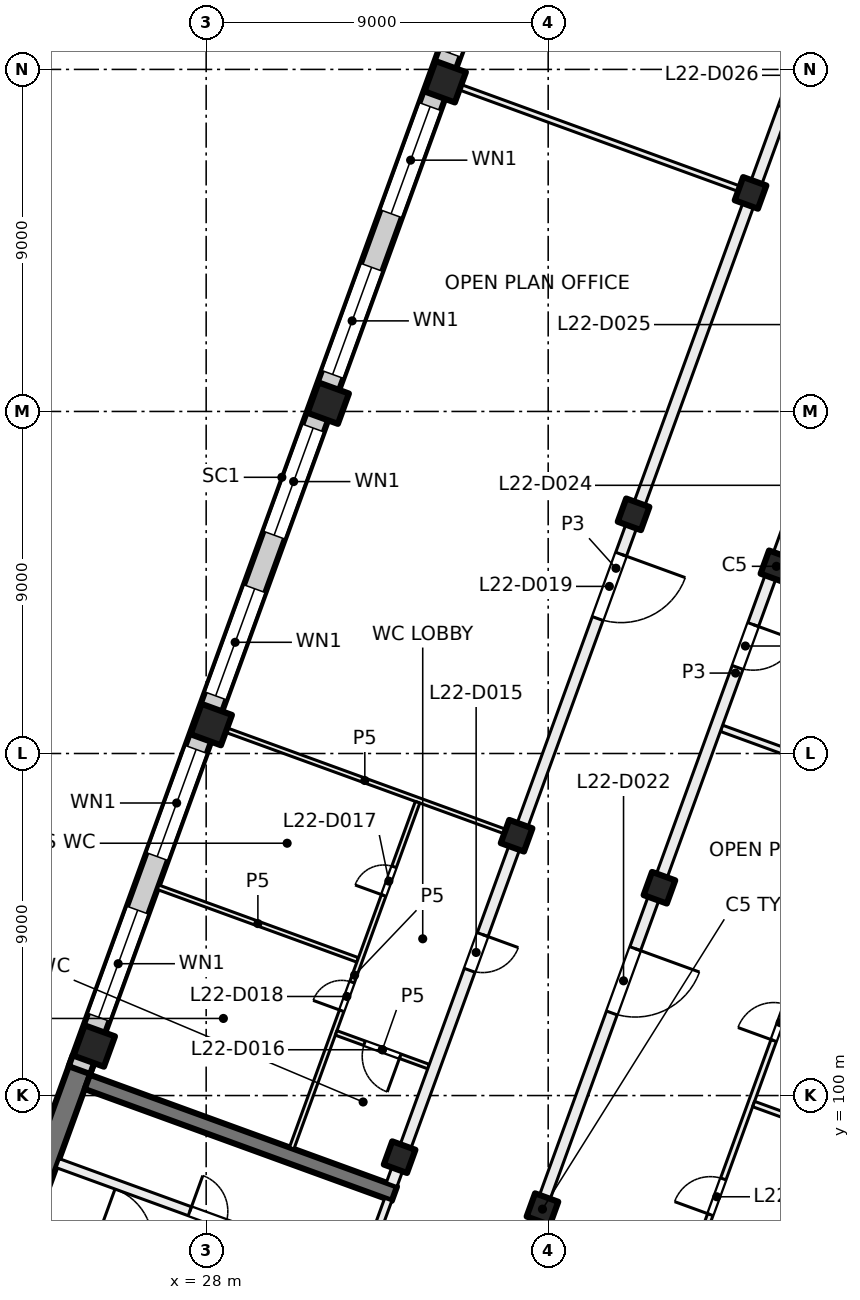
"""IFC4 building model, lengths in metres.
Left out: names, types, materials, properties, quantities, classifications, styles, units other than length and angle.
Written with IfcOpenShell. Run it as: python <this file> out.ifc"""

import sys

from ifc_helpers import new_model, si_unit, direction, frame, frame_2d, origin, origin_2d, place, context, subcontext, project, spatial, rectangle, extrude, element, fill, save


model = new_model("IFC4")
c1 = context("Model", 3, precision=1e-05, world=origin(), true_north=direction((0.0, 1.0)))
c2 = subcontext(c1, "Body", "Model", "MODEL_VIEW")
j1 = project(units=[si_unit("LENGTHUNIT", "METRE"), si_unit("PLANEANGLEUNIT", "RADIAN")], contexts=[c1])
p1 = place(None, origin())
s1 = spatial("IfcSite", under=j1, at=p1, CompositionType="ELEMENT")
p2 = place(p1, origin())
s2 = spatial("IfcBuilding", under=s1, at=p2, CompositionType="ELEMENT")
p3 = place(p2, frame((0.0, 0.0, 97.0)))
s3 = spatial("IfcBuildingStorey", under=s2, at=p3, CompositionType="ELEMENT", Elevation=97.0)
for number, where, z_axis, x_axis in (
    (1, (43.006, 113.925, 0.0), (0.0, 0.0, 1.0), (-0.342, -0.94, 0.0)),
    (2, (39.927, 105.468, 0.0), (0.0, 0.0, 1.0), (-0.342, -0.94, 0.0)),
    (3, (36.849, 97.011, 0.0), (0.0, 0.0, 1.0), (-0.342, -0.94, 0.0)),
    (4, (42.325, 123.751, 0.0), (0.0, 0.0, 1.0), (-0.342, -0.94, 0.0)),
    (5, (39.247, 115.293, 0.0), (0.0, 0.0, 1.0), (-0.342, -0.94, 0.0)),
    (6, (36.169, 106.836, 0.0), (0.0, 0.0, 1.0), (-0.342, -0.94, 0.0)),
    (7, (33.091, 98.379, 0.0), (0.0, 0.0, 1.0), (-0.342, -0.94, 0.0)),
):
    element("IfcColumn", number, at=place(p3, frame(where, z_axis=z_axis, x_axis=x_axis)), inside=s3, PredefinedType="COLUMN", context=c2, shape_type="SweptSolid", body=[
        extrude(rectangle(XDim=0.65, YDim=0.65, at=origin_2d()), origin(), (0.0, 0.0, 1.0), 4.0),
    ])
for number, where, z_axis, x_axis in (
    (8, (34.291, 126.675, 0.0), (0.0, 0.0, 1.0), (-0.342, -0.94, 0.0)),
    (9, (31.212, 118.218, 0.0), (0.0, 0.0, 1.0), (-0.342, -0.94, 0.0)),
    (10, (28.134, 109.76, 0.0), (0.0, 0.0, 1.0), (-0.342, -0.94, 0.0)),
    (11, (25.056, 101.303, 0.0), (0.0, 0.0, 1.0), (-0.342, -0.94, 0.0)),
):
    element("IfcColumn", number, at=place(p3, frame(where, z_axis=z_axis, x_axis=x_axis)), inside=s3, PredefinedType="COLUMN", context=c2, shape_type="SweptSolid", body=[
        extrude(rectangle(XDim=0.85, YDim=0.85, at=origin_2d()), origin(), (0.0, 0.0, 1.0), 4.0),
    ])
p4 = place(p3, frame((21.717, 92.568, 0.0), z_axis=(0.0, 0.0, 1.0), x_axis=(0.342017595281, 0.939693548195, 0.0)))
e12 = element("IfcWall", 12, at=p4, inside=s3, PredefinedType="SHEAR", context=c2, shape_type="SweptSolid", body=[
    extrude(rectangle(XDim=8.925, YDim=0.6, at=frame_2d((4.462, 0.0))), origin(), (0.0, 0.0, 1.0), 4.0),
])
p5 = place(p3, frame((32.953, 97.418, 0.0), z_axis=(0.0, 0.0, 1.0), x_axis=(-0.93969060187, 0.342025690201, 0.0)))
e13 = element("IfcWall", 13, at=p5, inside=s3, PredefinedType="SHEAR", context=c2, shape_type="SweptSolid", body=[
    extrude(rectangle(XDim=8.6, YDim=0.4, at=frame_2d((4.3, 0.0))), origin(), (0.0, 0.0, 1.0), 4.0),
])
p6 = place(p3, frame((24.666, 100.669, 0.0), z_axis=(0.0, 0.0, 1.0), x_axis=(0.34201964167, 0.939692803373, 0.0)))
e14 = element("IfcWall", 14, at=p6, inside=s3, PredefinedType="SOLIDWALL", context=c2, shape_type="SweptSolid", body=[
    extrude(rectangle(XDim=32.884, YDim=0.6, at=frame_2d((16.442, 0.0))), origin(), (0.0, 0.0, 1.0), 3.625),
])
p7 = place(p6, frame((1.48, 0.0, 0.9)))
e15 = element("IfcOpeningElement", 15, at=p7, cuts=e14, PredefinedType="OPENING", context=c2, shape_type="SweptSolid", body=[
    extrude(rectangle(XDim=3.0, YDim=2.4, at=frame_2d((1.5, 1.2))), frame((0.0, 0.31, 0.0), z_axis=(0.0, -1.0, 0.0), x_axis=(1.0, 0.0, 0.0)), (0.0, 0.0, 1.0), 0.62),
])
p8 = place(p6, frame((5.98, 0.0, 0.9)))
e16 = element("IfcOpeningElement", 16, at=p8, cuts=e14, PredefinedType="OPENING", context=c2, shape_type="SweptSolid", body=[
    extrude(rectangle(XDim=3.0, YDim=2.4, at=frame_2d((1.5, 1.2))), frame((0.0, 0.31, 0.0), z_axis=(0.0, -1.0, 0.0), x_axis=(1.0, 0.0, 0.0)), (0.0, 0.0, 1.0), 0.62),
])
p9 = place(p6, frame((10.48, 0.0, 0.9)))
e17 = element("IfcOpeningElement", 17, at=p9, cuts=e14, PredefinedType="OPENING", context=c2, shape_type="SweptSolid", body=[
    extrude(rectangle(XDim=3.0, YDim=2.4, at=frame_2d((1.5, 1.2))), frame((0.0, 0.31, 0.0), z_axis=(0.0, -1.0, 0.0), x_axis=(1.0, 0.0, 0.0)), (0.0, 0.0, 1.0), 0.62),
])
p10 = place(p6, frame((14.98, 0.0, 0.9)))
e18 = element("IfcOpeningElement", 18, at=p10, cuts=e14, PredefinedType="OPENING", context=c2, shape_type="SweptSolid", body=[
    extrude(rectangle(XDim=3.0, YDim=2.4, at=frame_2d((1.5, 1.2))), frame((0.0, 0.31, 0.0), z_axis=(0.0, -1.0, 0.0), x_axis=(1.0, 0.0, 0.0)), (0.0, 0.0, 1.0), 0.62),
])
p11 = place(p6, frame((19.48, 0.0, 0.9)))
e19 = element("IfcOpeningElement", 19, at=p11, cuts=e14, PredefinedType="OPENING", context=c2, shape_type="SweptSolid", body=[
    extrude(rectangle(XDim=3.0, YDim=2.4, at=frame_2d((1.5, 1.2))), frame((0.0, 0.31, 0.0), z_axis=(0.0, -1.0, 0.0), x_axis=(1.0, 0.0, 0.0)), (0.0, 0.0, 1.0), 0.62),
])
p12 = place(p6, frame((23.98, 0.0, 0.9)))
e20 = element("IfcOpeningElement", 20, at=p12, cuts=e14, PredefinedType="OPENING", context=c2, shape_type="SweptSolid", body=[
    extrude(rectangle(XDim=3.0, YDim=2.4, at=frame_2d((1.5, 1.2))), frame((0.0, 0.31, 0.0), z_axis=(0.0, -1.0, 0.0), x_axis=(1.0, 0.0, 0.0)), (0.0, 0.0, 1.0), 0.62),
])
p13 = place(p6, frame((28.48, 0.0, 0.9)))
e21 = element("IfcOpeningElement", 21, at=p13, cuts=e14, PredefinedType="OPENING", context=c2, shape_type="SweptSolid", body=[
    extrude(rectangle(XDim=3.0, YDim=2.4, at=frame_2d((1.5, 1.2))), frame((0.0, 0.31, 0.0), z_axis=(0.0, -1.0, 0.0), x_axis=(1.0, 0.0, 0.0)), (0.0, 0.0, 1.0), 0.62),
])
p14 = place(p3, frame((31.491, 93.693, 0.0), z_axis=(0.0, 0.0, 1.0), x_axis=(0.341995824804, 0.939701471648, 0.0)))
e22 = element("IfcWall", 22, at=p14, inside=s3, PredefinedType="PARTITIONING", context=c2, shape_type="SweptSolid", body=[
    extrude(rectangle(XDim=3.8, YDim=0.2, at=frame_2d((1.9, 0.0))), origin(), (0.0, 0.0, 1.0), 3.625),
])
p15 = place(p14, frame((0.3, 0.0, 0.0)))
e23 = element("IfcOpeningElement", 23, at=p15, cuts=e22, PredefinedType="OPENING", context=c2, shape_type="SweptSolid", body=[
    extrude(rectangle(XDim=1.2, YDim=2.1, at=frame_2d((0.6, 1.05))), frame((0.0, 0.11, 0.0), z_axis=(0.0, -1.0, 0.0), x_axis=(1.0, 0.0, 0.0)), (0.0, 0.0, 1.0), 0.22),
])
p16 = place(p3, frame((23.538, 96.694, 0.0), z_axis=(0.0, 0.0, 1.0), x_axis=(0.939691552312, -0.342023078919, 0.0)))
e24 = element("IfcWall", 24, at=p16, inside=s3, PredefinedType="PARTITIONING", context=c2, shape_type="SweptSolid", body=[
    extrude(rectangle(XDim=8.4, YDim=0.2, at=frame_2d((4.2, 0.0))), origin(), (0.0, 0.0, 1.0), 3.625),
])
p17 = place(p16, frame((1.65, 0.0, 0.0)))
e25 = element("IfcOpeningElement", 25, at=p17, cuts=e24, PredefinedType="OPENING", context=c2, shape_type="SweptSolid", body=[
    extrude(rectangle(XDim=1.5, YDim=2.1, at=frame_2d((0.75, 1.05))), frame((0.0, 0.11, 0.0), z_axis=(0.0, -1.0, 0.0), x_axis=(1.0, 0.0, 0.0)), (0.0, 0.0, 1.0), 0.22),
])
p18 = place(p3, frame((24.094, 98.221, 0.0), z_axis=(0.0, 0.0, 1.0), x_axis=(0.939691552312, -0.342023078919, 0.0)))
e26 = element("IfcWall", 26, at=p18, inside=s3, PredefinedType="PARTITIONING", context=c2, shape_type="SweptSolid", body=[
    extrude(rectangle(XDim=8.4, YDim=0.25, at=frame_2d((4.2, 0.0))), origin(), (0.0, 0.0, 1.0), 3.625),
])
p19 = place(p18, frame((3.7, 0.0, 0.0)))
e27 = element("IfcOpeningElement", 27, at=p19, cuts=e26, PredefinedType="OPENING", context=c2, shape_type="SweptSolid", body=[
    extrude(rectangle(XDim=1.0, YDim=2.1, at=frame_2d((0.5, 1.05))), frame((0.0, 0.135, 0.0), z_axis=(0.0, -1.0, 0.0), x_axis=(1.0, 0.0, 0.0)), (0.0, 0.0, 1.0), 0.27),
])
p20 = place(p3, frame((26.736, 105.48, 0.0), z_axis=(0.0, 0.0, 1.0), x_axis=(0.939690035435, -0.342027246436, 0.0)))
e28 = element("IfcWall", 28, at=p20, inside=s3, PredefinedType="PARTITIONING", context=c2, shape_type="SweptSolid", body=[
    extrude(rectangle(XDim=5.587, YDim=0.125, at=frame_2d((2.793, 0.0))), origin(), (0.0, 0.0, 1.0), 3.625),
])
p21 = place(p3, frame((28.275, 109.709, 0.0), z_axis=(0.0, 0.0, 1.0), x_axis=(0.939697205528, -0.342007546586, 0.0)))
e29 = element("IfcWall", 29, at=p21, inside=s3, PredefinedType="PARTITIONING", context=c2, shape_type="SweptSolid", body=[
    extrude(rectangle(XDim=8.301, YDim=0.125, at=frame_2d((4.15, 0.0))), origin(), (0.0, 0.0, 1.0), 3.625),
])
p22 = place(p3, frame((30.25, 98.615, 0.0), z_axis=(0.0, 0.0, 1.0), x_axis=(0.341998018937, 0.93970067311, 0.0)))
e30 = element("IfcWall", 30, at=p22, inside=s3, PredefinedType="PARTITIONING", context=c2, shape_type="SweptSolid", body=[
    extrude(rectangle(XDim=9.687, YDim=0.125, at=frame_2d((4.844, 0.0))), origin(), (0.0, 0.0, 1.0), 3.625),
])
p23 = place(p22, frame((7.078, 0.0, 0.0)))
e31 = element("IfcOpeningElement", 31, at=p23, cuts=e30, PredefinedType="OPENING", context=c2, shape_type="SweptSolid", body=[
    extrude(rectangle(XDim=0.8, YDim=2.1, at=frame_2d((0.4, 1.05))), frame((0.0, 0.073, 0.0), z_axis=(0.0, -1.0, 0.0), x_axis=(1.0, 0.0, 0.0)), (0.0, 0.0, 1.0), 0.145),
])
p24 = place(p22, frame((3.848, 0.0, 0.0)))
e32 = element("IfcOpeningElement", 32, at=p24, cuts=e30, PredefinedType="OPENING", context=c2, shape_type="SweptSolid", body=[
    extrude(rectangle(XDim=0.8, YDim=2.1, at=frame_2d((0.4, 1.05))), frame((0.0, 0.073, 0.0), z_axis=(0.0, -1.0, 0.0), x_axis=(1.0, 0.0, 0.0)), (0.0, 0.0, 1.0), 0.145),
])
p25 = place(p3, frame((33.852, 100.762, 0.0), z_axis=(0.0, 0.0, 1.0), x_axis=(-0.93959774877, 0.342280689649, 0.0)))
e33 = element("IfcWall", 33, at=p25, inside=s3, PredefinedType="PARTITIONING", context=c2, shape_type="SweptSolid", body=[
    extrude(rectangle(XDim=2.588, YDim=0.125, at=frame_2d((1.294, 0.0))), origin(), (0.0, 0.0, 1.0), 3.625),
])
p26 = place(p25, frame((0.794, 0.0, 0.0)))
e34 = element("IfcOpeningElement", 34, at=p26, cuts=e33, PredefinedType="OPENING", context=c2, shape_type="SweptSolid", body=[
    extrude(rectangle(XDim=1.0, YDim=2.1, at=frame_2d((0.5, 1.05))), frame((0.0, 0.073, 0.0), z_axis=(0.0, -1.0, 0.0), x_axis=(1.0, 0.0, 0.0)), (0.0, 0.0, 1.0), 0.145),
])
p27 = place(p3, frame((44.686, 130.091, 0.0), z_axis=(0.0, 0.0, 1.0), x_axis=(-0.342017360004, -0.939693633828, 0.0)))
e35 = element("IfcWall", 35, at=p27, inside=s3, PredefinedType="PARTITIONING", context=c2, shape_type="SweptSolid", body=[
    extrude(rectangle(XDim=34.516, YDim=0.3, at=frame_2d((17.258, 0.0))), origin(), (0.0, 0.0, 1.0), 3.625),
])
p28 = place(p27, frame((27.515, 0.0, 0.0)))
e36 = element("IfcOpeningElement", 36, at=p28, cuts=e35, PredefinedType="OPENING", context=c2, shape_type="SweptSolid", body=[
    extrude(rectangle(XDim=1.0, YDim=2.1, at=frame_2d((0.5, 1.05))), frame((0.0, 0.16, 0.0), z_axis=(0.0, -1.0, 0.0), x_axis=(1.0, 0.0, 0.0)), (0.0, 0.0, 1.0), 0.32),
])
p29 = place(p27, frame((16.865, 0.0, 0.0)))
e37 = element("IfcOpeningElement", 37, at=p29, cuts=e35, PredefinedType="OPENING", context=c2, shape_type="SweptSolid", body=[
    extrude(rectangle(XDim=1.8, YDim=2.1, at=frame_2d((0.9, 1.05))), frame((0.0, 0.16, 0.0), z_axis=(0.0, -1.0, 0.0), x_axis=(1.0, 0.0, 0.0)), (0.0, 0.0, 1.0), 0.32),
])
p30 = place(p27, frame((2.554, 0.0, 0.0)))
e38 = element("IfcOpeningElement", 38, at=p30, cuts=e35, PredefinedType="OPENING", context=c2, shape_type="SweptSolid", body=[
    extrude(rectangle(XDim=1.8, YDim=2.1, at=frame_2d((0.9, 1.05))), frame((0.0, 0.16, 0.0), z_axis=(0.0, -1.0, 0.0), x_axis=(1.0, 0.0, 0.0)), (0.0, 0.0, 1.0), 0.32),
])
p31 = place(p3, frame((40.539, 94.87, 0.0), z_axis=(0.0, 0.0, 1.0), x_axis=(0.342082231415, 0.939670020247, 0.0)))
e39 = element("IfcWall", 39, at=p31, inside=s3, PredefinedType="PARTITIONING", context=c2, shape_type="SweptSolid", body=[
    extrude(rectangle(XDim=9.825, YDim=0.15, at=frame_2d((4.912, 0.0))), origin(), (0.0, 0.0, 1.0), 3.625),
])
p32 = place(p31, frame((2.125, 0.0, 0.0)))
e40 = element("IfcOpeningElement", 40, at=p32, cuts=e39, PredefinedType="OPENING", context=c2, shape_type="SweptSolid", body=[
    extrude(rectangle(XDim=1.0, YDim=2.1, at=frame_2d((0.5, 1.05))), frame((0.0, 0.085, 0.0), z_axis=(0.0, -1.0, 0.0), x_axis=(1.0, 0.0, 0.0)), (0.0, 0.0, 1.0), 0.17),
])
p33 = place(p31, frame((7.0, 0.0, 0.0)))
e41 = element("IfcOpeningElement", 41, at=p33, cuts=e39, PredefinedType="OPENING", context=c2, shape_type="SweptSolid", body=[
    extrude(rectangle(XDim=1.0, YDim=2.1, at=frame_2d((0.5, 1.05))), frame((0.0, 0.085, 0.0), z_axis=(0.0, -1.0, 0.0), x_axis=(1.0, 0.0, 0.0)), (0.0, 0.0, 1.0), 0.17),
])
p34 = place(p3, frame((41.561, 109.663, 0.0), z_axis=(0.0, 0.0, 1.0), x_axis=(0.939673986983, -0.342071334939, 0.0)))
e42 = element("IfcWall", 42, at=p34, inside=s3, PredefinedType="PARTITIONING", context=c2, shape_type="SweptSolid", body=[
    extrude(rectangle(XDim=8.3, YDim=0.175, at=frame_2d((4.15, 0.0))), origin(), (0.0, 0.0, 1.0), 3.625),
])
p35 = place(p3, frame((42.405, 99.777, 0.0), z_axis=(0.0, 0.0, 1.0), x_axis=(0.939765774653, -0.341819087808, 0.0)))
e43 = element("IfcWall", 43, at=p35, inside=s3, PredefinedType="PARTITIONING", context=c2, shape_type="SweptSolid", body=[
    extrude(rectangle(XDim=4.125, YDim=0.15, at=frame_2d((2.063, 0.0))), origin(), (0.0, 0.0, 1.0), 3.625),
])
p36 = place(p3, frame((42.231, 123.785, 0.0), z_axis=(0.0, 0.0, 1.0), x_axis=(-0.939687752599, 0.342033518263, 0.0)))
e44 = element("IfcWall", 44, at=p36, inside=s3, PredefinedType="PARTITIONING", context=c2, shape_type="SweptSolid", body=[
    extrude(rectangle(XDim=8.301, YDim=0.15, at=frame_2d((4.15, 0.0))), origin(), (0.0, 0.0, 1.0), 3.625),
])
p37 = place(p3, frame((43.1, 113.891, 0.0), z_axis=(0.0, 0.0, 1.0), x_axis=(0.939670544866, -0.342080790328, 0.0)))
e45 = element("IfcWall", 45, at=p37, inside=s3, PredefinedType="PARTITIONING", context=c2, shape_type="SweptSolid", body=[
    extrude(rectangle(XDim=8.3, YDim=0.175, at=frame_2d((4.15, 0.0))), origin(), (0.0, 0.0, 1.0), 3.625),
])
p38 = place(p3, frame((47.314, 125.909, 0.0), z_axis=(0.0, 0.0, 1.0), x_axis=(-0.342010770371, -0.939696032209, 0.0)))
e46 = element("IfcWall", 46, at=p38, inside=s3, PredefinedType="PARTITIONING", context=c2, shape_type="SweptSolid", body=[
    extrude(rectangle(XDim=31.485, YDim=0.3, at=frame_2d((15.742, 0.0))), origin(), (0.0, 0.0, 1.0), 3.625),
])
p39 = place(p38, frame((23.459, 0.0, 0.0)))
e47 = element("IfcOpeningElement", 47, at=p39, cuts=e46, PredefinedType="OPENING", context=c2, shape_type="SweptSolid", body=[
    extrude(rectangle(XDim=1.8, YDim=2.1, at=frame_2d((0.9, 1.05))), frame((0.0, 0.16, 0.0), z_axis=(0.0, -1.0, 0.0), x_axis=(1.0, 0.0, 0.0)), (0.0, 0.0, 1.0), 0.32),
])
p40 = place(p38, frame((14.385, 0.0, 0.0)))
e48 = element("IfcOpeningElement", 48, at=p40, cuts=e46, PredefinedType="OPENING", context=c2, shape_type="SweptSolid", body=[
    extrude(rectangle(XDim=1.2, YDim=2.1, at=frame_2d((0.6, 1.05))), frame((0.0, 0.16, 0.0), z_axis=(0.0, -1.0, 0.0), x_axis=(1.0, 0.0, 0.0)), (0.0, 0.0, 1.0), 0.32),
])
p41 = place(p38, frame((9.885, 0.0, 0.0)))
e49 = element("IfcOpeningElement", 49, at=p41, cuts=e46, PredefinedType="OPENING", context=c2, shape_type="SweptSolid", body=[
    extrude(rectangle(XDim=1.2, YDim=2.1, at=frame_2d((0.6, 1.05))), frame((0.0, 0.16, 0.0), z_axis=(0.0, -1.0, 0.0), x_axis=(1.0, 0.0, 0.0)), (0.0, 0.0, 1.0), 0.32),
])
p42 = place(p38, frame((5.384, 0.0, 0.0)))
e50 = element("IfcOpeningElement", 50, at=p42, cuts=e46, PredefinedType="OPENING", context=c2, shape_type="SweptSolid", body=[
    extrude(rectangle(XDim=1.2, YDim=2.1, at=frame_2d((0.6, 1.05))), frame((0.0, 0.16, 0.0), z_axis=(0.0, -1.0, 0.0), x_axis=(1.0, 0.0, 0.0)), (0.0, 0.0, 1.0), 0.32),
])
p43 = place(p7, origin())
e51 = element("IfcWindow", 51, at=p43, inside=s3, PartitioningType="SINGLE_PANEL", PredefinedType="WINDOW", context=c2, shape_type="SweptSolid", body=[
    extrude(rectangle(XDim=3.0, YDim=2.4, at=frame_2d((1.5, 1.2))), frame((0.0, 0.03, 0.0), z_axis=(0.0, -1.0, 0.0), x_axis=(1.0, 0.0, 0.0)), (0.0, 0.0, 1.0), 0.06),
])
fill(e15, e51)
p44 = place(p8, origin())
e52 = element("IfcWindow", 52, at=p44, inside=s3, PartitioningType="SINGLE_PANEL", PredefinedType="WINDOW", context=c2, shape_type="SweptSolid", body=[
    extrude(rectangle(XDim=3.0, YDim=2.4, at=frame_2d((1.5, 1.2))), frame((0.0, 0.03, 0.0), z_axis=(0.0, -1.0, 0.0), x_axis=(1.0, 0.0, 0.0)), (0.0, 0.0, 1.0), 0.06),
])
fill(e16, e52)
p45 = place(p9, origin())
e53 = element("IfcWindow", 53, at=p45, inside=s3, PartitioningType="SINGLE_PANEL", PredefinedType="WINDOW", context=c2, shape_type="SweptSolid", body=[
    extrude(rectangle(XDim=3.0, YDim=2.4, at=frame_2d((1.5, 1.2))), frame((0.0, 0.03, 0.0), z_axis=(0.0, -1.0, 0.0), x_axis=(1.0, 0.0, 0.0)), (0.0, 0.0, 1.0), 0.06),
])
fill(e17, e53)
p46 = place(p10, origin())
e54 = element("IfcWindow", 54, at=p46, inside=s3, PartitioningType="SINGLE_PANEL", PredefinedType="WINDOW", context=c2, shape_type="SweptSolid", body=[
    extrude(rectangle(XDim=3.0, YDim=2.4, at=frame_2d((1.5, 1.2))), frame((0.0, 0.03, 0.0), z_axis=(0.0, -1.0, 0.0), x_axis=(1.0, 0.0, 0.0)), (0.0, 0.0, 1.0), 0.06),
])
fill(e18, e54)
p47 = place(p11, origin())
e55 = element("IfcWindow", 55, at=p47, inside=s3, PartitioningType="SINGLE_PANEL", PredefinedType="WINDOW", context=c2, shape_type="SweptSolid", body=[
    extrude(rectangle(XDim=3.0, YDim=2.4, at=frame_2d((1.5, 1.2))), frame((0.0, 0.03, 0.0), z_axis=(0.0, -1.0, 0.0), x_axis=(1.0, 0.0, 0.0)), (0.0, 0.0, 1.0), 0.06),
])
fill(e19, e55)
p48 = place(p12, origin())
e56 = element("IfcWindow", 56, at=p48, inside=s3, PartitioningType="SINGLE_PANEL", PredefinedType="WINDOW", context=c2, shape_type="SweptSolid", body=[
    extrude(rectangle(XDim=3.0, YDim=2.4, at=frame_2d((1.5, 1.2))), frame((0.0, 0.03, 0.0), z_axis=(0.0, -1.0, 0.0), x_axis=(1.0, 0.0, 0.0)), (0.0, 0.0, 1.0), 0.06),
])
fill(e20, e56)
p49 = place(p13, origin())
e57 = element("IfcWindow", 57, at=p49, inside=s3, PartitioningType="SINGLE_PANEL", PredefinedType="WINDOW", context=c2, shape_type="SweptSolid", body=[
    extrude(rectangle(XDim=3.0, YDim=2.4, at=frame_2d((1.5, 1.2))), frame((0.0, 0.03, 0.0), z_axis=(0.0, -1.0, 0.0), x_axis=(1.0, 0.0, 0.0)), (0.0, 0.0, 1.0), 0.06),
])
fill(e21, e57)
p50 = place(p19, origin())
e58 = element("IfcDoor", 58, at=p50, inside=s3, OperationType="SINGLE_SWING_LEFT", PredefinedType="DOOR", context=c2, shape_type="SweptSolid", body=[
    extrude(rectangle(XDim=1.0, YDim=2.1, at=frame_2d((0.5, 1.05))), frame((0.0, 0.025, 0.0), z_axis=(0.0, -1.0, 0.0), x_axis=(1.0, 0.0, 0.0)), (0.0, 0.0, 1.0), 0.05),
])
fill(e27, e58)
p51 = place(p28, origin())
e59 = element("IfcDoor", 59, at=p51, inside=s3, OperationType="SINGLE_SWING_RIGHT", PredefinedType="DOOR", context=c2, shape_type="SweptSolid", body=[
    extrude(rectangle(XDim=1.0, YDim=2.1, at=frame_2d((0.5, 1.05))), frame((0.0, 0.025, 0.0), z_axis=(0.0, -1.0, 0.0), x_axis=(1.0, 0.0, 0.0)), (0.0, 0.0, 1.0), 0.05),
])
fill(e36, e59)
p52 = place(p26, origin())
e60 = element("IfcDoor", 60, at=p52, inside=s3, OperationType="SINGLE_SWING_RIGHT", PredefinedType="DOOR", context=c2, shape_type="SweptSolid", body=[
    extrude(rectangle(XDim=1.0, YDim=2.1, at=frame_2d((0.5, 1.05))), frame((0.0, 0.025, 0.0), z_axis=(0.0, -1.0, 0.0), x_axis=(1.0, 0.0, 0.0)), (0.0, 0.0, 1.0), 0.05),
])
fill(e34, e60)
p53 = place(p23, origin())
e61 = element("IfcDoor", 61, at=p53, inside=s3, OperationType="SINGLE_SWING_RIGHT", PredefinedType="DOOR", context=c2, shape_type="SweptSolid", body=[
    extrude(rectangle(XDim=0.8, YDim=2.1, at=frame_2d((0.4, 1.05))), frame((0.0, 0.025, 0.0), z_axis=(0.0, -1.0, 0.0), x_axis=(1.0, 0.0, 0.0)), (0.0, 0.0, 1.0), 0.05),
])
fill(e31, e61)
p54 = place(p24, origin())
e62 = element("IfcDoor", 62, at=p54, inside=s3, OperationType="SINGLE_SWING_RIGHT", PredefinedType="DOOR", context=c2, shape_type="SweptSolid", body=[
    extrude(rectangle(XDim=0.8, YDim=2.1, at=frame_2d((0.4, 1.05))), frame((0.0, 0.025, 0.0), z_axis=(0.0, -1.0, 0.0), x_axis=(1.0, 0.0, 0.0)), (0.0, 0.0, 1.0), 0.05),
])
fill(e32, e62)
p55 = place(p29, origin())
e63 = element("IfcDoor", 63, at=p55, inside=s3, OperationType="DOUBLE_DOOR_SINGLE_SWING", PredefinedType="DOOR", context=c2, shape_type="SweptSolid", body=[
    extrude(rectangle(XDim=1.8, YDim=2.1, at=frame_2d((0.9, 1.05))), frame((0.0, 0.025, 0.0), z_axis=(0.0, -1.0, 0.0), x_axis=(1.0, 0.0, 0.0)), (0.0, 0.0, 1.0), 0.05),
])
fill(e37, e63)
p56 = place(p32, origin())
e64 = element("IfcDoor", 64, at=p56, inside=s3, OperationType="SINGLE_SWING_LEFT", PredefinedType="DOOR", context=c2, shape_type="SweptSolid", body=[
    extrude(rectangle(XDim=1.0, YDim=2.1, at=frame_2d((0.5, 1.05))), frame((0.0, 0.025, 0.0), z_axis=(0.0, -1.0, 0.0), x_axis=(1.0, 0.0, 0.0)), (0.0, 0.0, 1.0), 0.05),
])
fill(e40, e64)
p57 = place(p33, origin())
e65 = element("IfcDoor", 65, at=p57, inside=s3, OperationType="SINGLE_SWING_LEFT", PredefinedType="DOOR", context=c2, shape_type="SweptSolid", body=[
    extrude(rectangle(XDim=1.0, YDim=2.1, at=frame_2d((0.5, 1.05))), frame((0.0, 0.025, 0.0), z_axis=(0.0, -1.0, 0.0), x_axis=(1.0, 0.0, 0.0)), (0.0, 0.0, 1.0), 0.05),
])
fill(e41, e65)
p58 = place(p39, origin())
e66 = element("IfcDoor", 66, at=p58, inside=s3, OperationType="DOUBLE_DOOR_SINGLE_SWING", PredefinedType="DOOR", context=c2, shape_type="SweptSolid", body=[
    extrude(rectangle(XDim=1.8, YDim=2.1, at=frame_2d((0.9, 1.05))), frame((0.0, 0.025, 0.0), z_axis=(0.0, -1.0, 0.0), x_axis=(1.0, 0.0, 0.0)), (0.0, 0.0, 1.0), 0.05),
])
fill(e47, e66)
p59 = place(p40, origin())
e67 = element("IfcDoor", 67, at=p59, inside=s3, OperationType="DOUBLE_DOOR_SINGLE_SWING", PredefinedType="DOOR", context=c2, shape_type="SweptSolid", body=[
    extrude(rectangle(XDim=1.2, YDim=2.1, at=frame_2d((0.6, 1.05))), frame((0.0, 0.025, 0.0), z_axis=(0.0, -1.0, 0.0), x_axis=(1.0, 0.0, 0.0)), (0.0, 0.0, 1.0), 0.05),
])
fill(e48, e67)
save(model, sys.argv[1])
